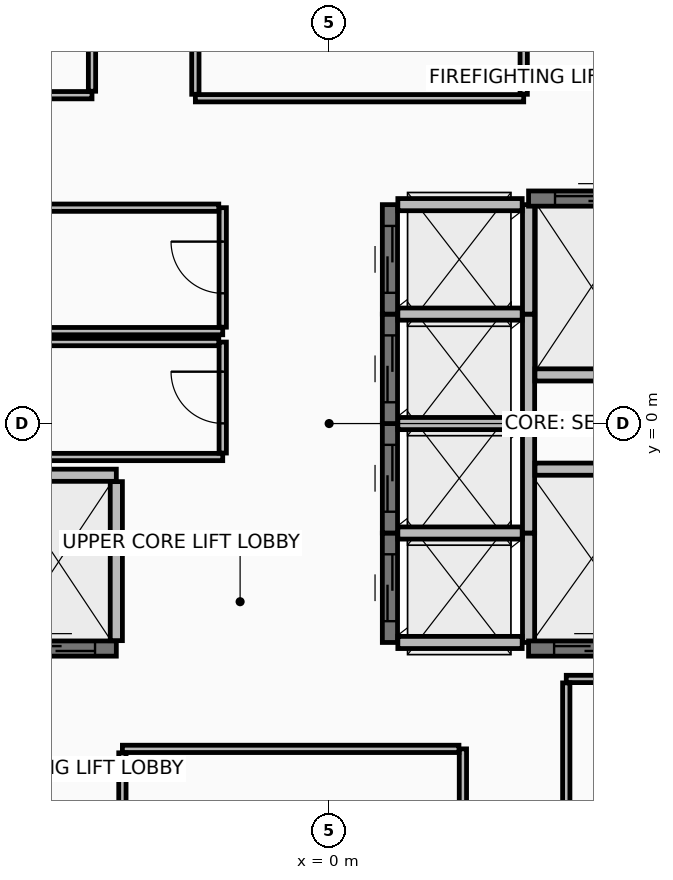
"""IFC4 building model, lengths in metres.
Left out: names, types, materials, properties, quantities, classifications, styles, units other than length and angle.
Written with IfcOpenShell. Run it as: python <this file> out.ifc"""

import sys

from ifc_helpers import new_model, si_unit, direction, frame, frame_2d, origin, place, context, subcontext, project, spatial, rectangle, extrude, element, fill, save


model = new_model("IFC4")
c1 = context("Model", 3, precision=1e-05, world=origin(), true_north=direction((0.0, 1.0)))
c2 = subcontext(c1, "Body", "Model", "MODEL_VIEW")
j1 = project(units=[si_unit("LENGTHUNIT", "METRE"), si_unit("PLANEANGLEUNIT", "RADIAN")], contexts=[c1])
p1 = place(None, origin())
s1 = spatial("IfcSite", under=j1, at=p1, CompositionType="ELEMENT")
p2 = place(p1, origin())
s2 = spatial("IfcBuilding", under=s1, at=p2, CompositionType="ELEMENT")
p3 = place(p2, frame((0.0, 0.0, 260.6)))
s3 = spatial("IfcBuildingStorey", under=s2, at=p3, CompositionType="ELEMENT", Elevation=260.6)
p4 = place(p3, frame((1.0, -3.6, 0.0), z_axis=(0.0, 0.0, 1.0), x_axis=(0.0, 1.0, 0.0)))
e1 = element("IfcWall", 1, at=p4, inside=s3, PredefinedType="SHEAR", context=c2, shape_type="SweptSolid", body=[
    extrude(rectangle(XDim=1.8, YDim=0.25, at=frame_2d((0.9, 0.0))), origin(), (0.0, 0.0, 1.0), 3.42),
])
p5 = place(p4, frame((0.35, 0.0, 0.0)))
e2 = element("IfcOpeningElement", 2, at=p5, cuts=e1, PredefinedType="OPENING", context=c2, shape_type="SweptSolid", body=[
    extrude(rectangle(XDim=1.1, YDim=2.2, at=frame_2d((0.55, 1.1))), frame((0.0, 0.135, 0.0), z_axis=(0.0, -1.0, 0.0), x_axis=(1.0, 0.0, 0.0)), (0.0, 0.0, 1.0), 0.27),
])
p6 = place(p3, frame((3.28, -3.6, 0.0), z_axis=(0.0, 0.0, 1.0), x_axis=(0.0, 1.0, 0.0)))
e3 = element("IfcWall", 3, at=p6, inside=s3, PredefinedType="PARTITIONING", context=c2, shape_type="SweptSolid", body=[
    extrude(rectangle(XDim=1.8, YDim=0.2, at=frame_2d((0.9, 0.0))), origin(), (0.0, 0.0, 1.0), 3.42),
])
for number, where, z_axis, x_axis in (
    (4, (1.13, -3.6, 0.0), (0.0, 0.0, 1.0), (1.0, 0.0, 0.0)),
    (5, (1.13, -1.8, 0.0), (0.0, 0.0, 1.0), (1.0, 0.0, 0.0)),
):
    element("IfcWall", number, at=place(p3, frame(where, z_axis=z_axis, x_axis=x_axis)), inside=s3, PredefinedType="PARTITIONING", context=c2, shape_type="SweptSolid", body=[
        extrude(rectangle(XDim=2.045, YDim=0.2, at=frame_2d((1.022, 0.0))), origin(), (0.0, 0.0, 1.0), 3.42),
    ])
p7 = place(p3, frame((1.0, -1.8, 0.0), z_axis=(0.0, 0.0, 1.0), x_axis=(0.0, 1.0, 0.0)))
e6 = element("IfcWall", 6, at=p7, inside=s3, PredefinedType="SHEAR", context=c2, shape_type="SweptSolid", body=[
    extrude(rectangle(XDim=1.8, YDim=0.25, at=frame_2d((0.9, 0.0))), origin(), (0.0, 0.0, 1.0), 3.42),
])
p8 = place(p7, frame((0.35, 0.0, 0.0)))
e7 = element("IfcOpeningElement", 7, at=p8, cuts=e6, PredefinedType="OPENING", context=c2, shape_type="SweptSolid", body=[
    extrude(rectangle(XDim=1.1, YDim=2.2, at=frame_2d((0.55, 1.1))), frame((0.0, 0.135, 0.0), z_axis=(0.0, -1.0, 0.0), x_axis=(1.0, 0.0, 0.0)), (0.0, 0.0, 1.0), 0.27),
])
p9 = place(p3, frame((3.28, -1.8, 0.0), z_axis=(0.0, 0.0, 1.0), x_axis=(0.0, 1.0, 0.0)))
e8 = element("IfcWall", 8, at=p9, inside=s3, PredefinedType="PARTITIONING", context=c2, shape_type="SweptSolid", body=[
    extrude(rectangle(XDim=1.8, YDim=0.2, at=frame_2d((0.9, 0.0))), origin(), (0.0, 0.0, 1.0), 3.42),
])
p10 = place(p3, frame((1.13, 0.0, 0.0), z_axis=(0.0, 0.0, 1.0), x_axis=(1.0, 0.0, 0.0)))
e9 = element("IfcWall", 9, at=p10, inside=s3, PredefinedType="PARTITIONING", context=c2, shape_type="SweptSolid", body=[
    extrude(rectangle(XDim=2.045, YDim=0.2, at=frame_2d((1.022, 0.0))), origin(), (0.0, 0.0, 1.0), 3.42),
])
p11 = place(p3, frame((1.0, 0.0, 0.0), z_axis=(0.0, 0.0, 1.0), x_axis=(0.0, 1.0, 0.0)))
e10 = element("IfcWall", 10, at=p11, inside=s3, PredefinedType="SHEAR", context=c2, shape_type="SweptSolid", body=[
    extrude(rectangle(XDim=1.8, YDim=0.25, at=frame_2d((0.9, 0.0))), origin(), (0.0, 0.0, 1.0), 3.42),
])
p12 = place(p11, frame((0.35, 0.0, 0.0)))
e11 = element("IfcOpeningElement", 11, at=p12, cuts=e10, PredefinedType="OPENING", context=c2, shape_type="SweptSolid", body=[
    extrude(rectangle(XDim=1.1, YDim=2.2, at=frame_2d((0.55, 1.1))), frame((0.0, 0.135, 0.0), z_axis=(0.0, -1.0, 0.0), x_axis=(1.0, 0.0, 0.0)), (0.0, 0.0, 1.0), 0.27),
])
p13 = place(p3, frame((3.28, 0.0, 0.0), z_axis=(0.0, 0.0, 1.0), x_axis=(0.0, 1.0, 0.0)))
e12 = element("IfcWall", 12, at=p13, inside=s3, PredefinedType="PARTITIONING", context=c2, shape_type="SweptSolid", body=[
    extrude(rectangle(XDim=1.8, YDim=0.2, at=frame_2d((0.9, 0.0))), origin(), (0.0, 0.0, 1.0), 3.42),
])
p14 = place(p3, frame((1.13, 1.8, 0.0), z_axis=(0.0, 0.0, 1.0), x_axis=(1.0, 0.0, 0.0)))
e13 = element("IfcWall", 13, at=p14, inside=s3, PredefinedType="PARTITIONING", context=c2, shape_type="SweptSolid", body=[
    extrude(rectangle(XDim=2.045, YDim=0.2, at=frame_2d((1.022, 0.0))), origin(), (0.0, 0.0, 1.0), 3.42),
])
p15 = place(p3, frame((1.0, 1.8, 0.0), z_axis=(0.0, 0.0, 1.0), x_axis=(0.0, 1.0, 0.0)))
e14 = element("IfcWall", 14, at=p15, inside=s3, PredefinedType="SHEAR", context=c2, shape_type="SweptSolid", body=[
    extrude(rectangle(XDim=1.8, YDim=0.25, at=frame_2d((0.9, 0.0))), origin(), (0.0, 0.0, 1.0), 3.42),
])
p16 = place(p15, frame((0.35, 0.0, 0.0)))
e15 = element("IfcOpeningElement", 15, at=p16, cuts=e14, PredefinedType="OPENING", context=c2, shape_type="SweptSolid", body=[
    extrude(rectangle(XDim=1.1, YDim=2.2, at=frame_2d((0.55, 1.1))), frame((0.0, 0.135, 0.0), z_axis=(0.0, -1.0, 0.0), x_axis=(1.0, 0.0, 0.0)), (0.0, 0.0, 1.0), 0.27),
])
p17 = place(p3, frame((3.28, 1.8, 0.0), z_axis=(0.0, 0.0, 1.0), x_axis=(0.0, 1.0, 0.0)))
e16 = element("IfcWall", 16, at=p17, inside=s3, PredefinedType="PARTITIONING", context=c2, shape_type="SweptSolid", body=[
    extrude(rectangle(XDim=1.8, YDim=0.2, at=frame_2d((0.9, 0.0))), origin(), (0.0, 0.0, 1.0), 3.42),
])
p18 = place(p3, frame((1.13, 3.6, 0.0), z_axis=(0.0, 0.0, 1.0), x_axis=(1.0, 0.0, 0.0)))
e17 = element("IfcWall", 17, at=p18, inside=s3, PredefinedType="PARTITIONING", context=c2, shape_type="SweptSolid", body=[
    extrude(rectangle(XDim=2.045, YDim=0.2, at=frame_2d((1.022, 0.0))), origin(), (0.0, 0.0, 1.0), 2.715),
])
p19 = place(p3, frame((-5.4, -3.7, 0.0), z_axis=(0.0, 0.0, 1.0), x_axis=(1.0, 0.0, 0.0)))
e18 = element("IfcWall", 18, at=p19, inside=s3, PredefinedType="SHEAR", context=c2, shape_type="SweptSolid", body=[
    extrude(rectangle(XDim=1.9, YDim=0.25, at=frame_2d((0.95, 0.0))), origin(), (0.0, 0.0, 1.0), 3.42),
])
p20 = place(p19, frame((0.35, 0.0, 0.0)))
e19 = element("IfcOpeningElement", 19, at=p20, cuts=e18, PredefinedType="OPENING", context=c2, shape_type="SweptSolid", body=[
    extrude(rectangle(XDim=1.2, YDim=2.2, at=frame_2d((0.6, 1.1))), frame((0.0, 0.135, 0.0), z_axis=(0.0, -1.0, 0.0), x_axis=(1.0, 0.0, 0.0)), (0.0, 0.0, 1.0), 0.27),
])
p21 = place(p3, frame((-5.27, -0.85, 0.0), z_axis=(0.0, 0.0, 1.0), x_axis=(1.0, 0.0, 0.0)))
e20 = element("IfcWall", 20, at=p21, inside=s3, PredefinedType="PARTITIONING", context=c2, shape_type="SweptSolid", body=[
    extrude(rectangle(XDim=1.77, YDim=0.2, at=frame_2d((0.885, 0.0))), origin(), (0.0, 0.0, 1.0), 3.42),
])
p22 = place(p3, frame((-3.5, -3.57, 0.0), z_axis=(0.0, 0.0, 1.0), x_axis=(0.0, 1.0, 0.0)))
e21 = element("IfcWall", 21, at=p22, inside=s3, PredefinedType="PARTITIONING", context=c2, shape_type="SweptSolid", body=[
    extrude(rectangle(XDim=2.615, YDim=0.2, at=frame_2d((1.308, 0.0))), origin(), (0.0, 0.0, 1.0), 3.42),
])
p23 = place(p3, frame((3.28, 3.7, 0.0), z_axis=(0.0, 0.0, 1.0), x_axis=(1.0, 0.0, 0.0)))
e22 = element("IfcWall", 22, at=p23, inside=s3, PredefinedType="SHEAR", context=c2, shape_type="SweptSolid", body=[
    extrude(rectangle(XDim=2.07, YDim=0.25, at=frame_2d((1.035, 0.0))), origin(), (0.0, 0.0, 1.0), 3.42),
])
p24 = place(p23, frame((0.435, 0.0, 0.0)))
e23 = element("IfcOpeningElement", 23, at=p24, cuts=e22, PredefinedType="OPENING", context=c2, shape_type="SweptSolid", body=[
    extrude(rectangle(XDim=1.2, YDim=2.2, at=frame_2d((0.6, 1.1))), frame((0.0, 0.135, 0.0), z_axis=(0.0, -1.0, 0.0), x_axis=(1.0, 0.0, 0.0)), (0.0, 0.0, 1.0), 0.27),
])
p25 = place(p3, frame((3.385, 0.8, 0.0), z_axis=(0.0, 0.0, 1.0), x_axis=(1.0, 0.0, 0.0)))
e24 = element("IfcWall", 24, at=p25, inside=s3, PredefinedType="PARTITIONING", context=c2, shape_type="SweptSolid", body=[
    extrude(rectangle(XDim=1.835, YDim=0.2, at=frame_2d((0.917, 0.0))), origin(), (0.0, 0.0, 1.0), 3.42),
])
p26 = place(p3, frame((3.28, -3.7, 0.0), z_axis=(0.0, 0.0, 1.0), x_axis=(1.0, 0.0, 0.0)))
e25 = element("IfcWall", 25, at=p26, inside=s3, PredefinedType="SHEAR", context=c2, shape_type="SweptSolid", body=[
    extrude(rectangle(XDim=1.94, YDim=0.25, at=frame_2d((0.97, 0.0))), origin(), (0.0, 0.0, 1.0), 3.42),
])
p27 = place(p26, frame((0.42, 0.0, 0.0)))
e26 = element("IfcOpeningElement", 26, at=p27, cuts=e25, PredefinedType="OPENING", context=c2, shape_type="SweptSolid", body=[
    extrude(rectangle(XDim=1.1, YDim=2.2, at=frame_2d((0.55, 1.1))), frame((0.0, 0.135, 0.0), z_axis=(0.0, -1.0, 0.0), x_axis=(1.0, 0.0, 0.0)), (0.0, 0.0, 1.0), 0.27),
])
p28 = place(p3, frame((3.385, -0.75, 0.0), z_axis=(0.0, 0.0, 1.0), x_axis=(1.0, 0.0, 0.0)))
e27 = element("IfcWall", 27, at=p28, inside=s3, PredefinedType="PARTITIONING", context=c2, shape_type="SweptSolid", body=[
    extrude(rectangle(XDim=1.835, YDim=0.2, at=frame_2d((0.917, 0.0))), origin(), (0.0, 0.0, 1.0), 3.42),
])
p29 = place(p3, frame((-5.22, 1.52, 0.0), z_axis=(0.0, 0.0, 1.0), x_axis=(1.0, 0.0, 0.0)))
e28 = element("IfcWall", 28, at=p29, inside=s3, PredefinedType="PARTITIONING", context=c2, shape_type="SweptSolid", body=[
    extrude(rectangle(XDim=3.47, YDim=0.12, at=frame_2d((1.735, 0.0))), origin(), (0.0, 0.0, 1.0), 3.42),
])
p30 = place(p3, frame((-1.75, 1.585, 0.0), z_axis=(0.0, 0.0, 1.0), x_axis=(0.0, 1.0, 0.0)))
e29 = element("IfcWall", 29, at=p30, inside=s3, PredefinedType="PARTITIONING", context=c2, shape_type="SweptSolid", body=[
    extrude(rectangle(XDim=1.965, YDim=0.12, at=frame_2d((0.982, 0.0))), origin(), (0.0, 0.0, 1.0), 3.42),
])
p31 = place(p30, frame((0.557, 0.0, 0.0)))
e30 = element("IfcOpeningElement", 30, at=p31, cuts=e29, PredefinedType="OPENING", context=c2, shape_type="SweptSolid", body=[
    extrude(rectangle(XDim=0.85, YDim=2.1, at=frame_2d((0.425, 1.05))), frame((0.0, 0.07, 0.0), z_axis=(0.0, -1.0, 0.0), x_axis=(1.0, 0.0, 0.0)), (0.0, 0.0, 1.0), 0.14),
])
p32 = place(p3, frame((-1.815, 3.55, 0.0), z_axis=(0.0, 0.0, 1.0), x_axis=(-1.0, 0.0, 0.0)))
e31 = element("IfcWall", 31, at=p32, inside=s3, PredefinedType="PARTITIONING", context=c2, shape_type="SweptSolid", body=[
    extrude(rectangle(XDim=3.405, YDim=0.12, at=frame_2d((1.703, 0.0))), origin(), (0.0, 0.0, 1.0), 3.42),
])
p33 = place(p3, frame((-5.22, -0.55, 0.0), z_axis=(0.0, 0.0, 1.0), x_axis=(1.0, 0.0, 0.0)))
e32 = element("IfcWall", 32, at=p33, inside=s3, PredefinedType="PARTITIONING", context=c2, shape_type="SweptSolid", body=[
    extrude(rectangle(XDim=3.47, YDim=0.12, at=frame_2d((1.735, 0.0))), origin(), (0.0, 0.0, 1.0), 3.42),
])
p34 = place(p3, frame((-1.75, -0.485, 0.0), z_axis=(0.0, 0.0, 1.0), x_axis=(0.0, 1.0, 0.0)))
e33 = element("IfcWall", 33, at=p34, inside=s3, PredefinedType="PARTITIONING", context=c2, shape_type="SweptSolid", body=[
    extrude(rectangle(XDim=1.825, YDim=0.12, at=frame_2d((0.913, 0.0))), origin(), (0.0, 0.0, 1.0), 3.42),
])
p35 = place(p34, frame((0.488, 0.0, 0.0)))
e34 = element("IfcOpeningElement", 34, at=p35, cuts=e33, PredefinedType="OPENING", context=c2, shape_type="SweptSolid", body=[
    extrude(rectangle(XDim=0.85, YDim=2.1, at=frame_2d((0.425, 1.05))), frame((0.0, 0.07, 0.0), z_axis=(0.0, -1.0, 0.0), x_axis=(1.0, 0.0, 0.0)), (0.0, 0.0, 1.0), 0.14),
])
p36 = place(p3, frame((-1.815, 1.34, 0.0), z_axis=(0.0, 0.0, 1.0), x_axis=(-1.0, 0.0, 0.0)))
e35 = element("IfcWall", 35, at=p36, inside=s3, PredefinedType="PARTITIONING", context=c2, shape_type="SweptSolid", body=[
    extrude(rectangle(XDim=3.405, YDim=0.12, at=frame_2d((1.703, 0.0))), origin(), (0.0, 0.0, 1.0), 3.42),
])
p37 = place(p3, frame((2.2, -7.42, 0.0), z_axis=(0.0, 0.0, 1.0), x_axis=(0.0, 1.0, 0.0)))
e36 = element("IfcWall", 36, at=p37, inside=s3, PredefinedType="PARTITIONING", context=c2, shape_type="SweptSolid", body=[
    extrude(rectangle(XDim=2.07, YDim=0.12, at=frame_2d((1.035, 0.0))), origin(), (0.0, 0.0, 1.0), 2.715),
])
p38 = place(p3, frame((2.135, -5.35, 0.0), z_axis=(0.0, 0.0, 1.0), x_axis=(-1.0, 0.0, 0.0)))
e37 = element("IfcWall", 37, at=p38, inside=s3, PredefinedType="PARTITIONING", context=c2, shape_type="SweptSolid", body=[
    extrude(rectangle(XDim=5.535, YDim=0.12, at=frame_2d((2.768, 0.0))), origin(), (0.0, 0.0, 1.0), 2.715),
])
p39 = place(p3, frame((-3.4, -5.415, 0.0), z_axis=(0.0, 0.0, 1.0), x_axis=(0.0, -1.0, 0.0)))
e38 = element("IfcWall", 38, at=p39, inside=s3, PredefinedType="PARTITIONING", context=c2, shape_type="SweptSolid", body=[
    extrude(rectangle(XDim=2.8, YDim=0.12, at=frame_2d((1.4, 0.0))), origin(), (0.0, 0.0, 1.0), 2.715),
])
p40 = place(p3, frame((-2.2, 5.35, 0.0), z_axis=(0.0, 0.0, 1.0), x_axis=(1.0, 0.0, 0.0)))
e39 = element("IfcWall", 39, at=p40, inside=s3, PredefinedType="PARTITIONING", context=c2, shape_type="SweptSolid", body=[
    extrude(rectangle(XDim=5.4, YDim=0.12, at=frame_2d((2.7, 0.0))), origin(), (0.0, 0.0, 1.0), 2.715),
])
p41 = place(p3, frame((3.2, 5.415, 0.0), z_axis=(0.0, 0.0, 1.0), x_axis=(0.0, 1.0, 0.0)))
e40 = element("IfcWall", 40, at=p41, inside=s3, PredefinedType="PARTITIONING", context=c2, shape_type="SweptSolid", body=[
    extrude(rectangle(XDim=2.8, YDim=0.12, at=frame_2d((1.4, 0.0))), origin(), (0.0, 0.0, 1.0), 2.715),
])
p42 = place(p3, frame((-2.2, 7.42, 0.0), z_axis=(0.0, 0.0, 1.0), x_axis=(0.0, -1.0, 0.0)))
e41 = element("IfcWall", 41, at=p42, inside=s3, PredefinedType="PARTITIONING", context=c2, shape_type="SweptSolid", body=[
    extrude(rectangle(XDim=2.005, YDim=0.12, at=frame_2d((1.002, 0.0))), origin(), (0.0, 0.0, 1.0), 2.715),
])
p43 = place(p3, frame((-6.2, 5.4, 0.0), z_axis=(0.0, 0.0, 1.0), x_axis=(1.0, 0.0, 0.0)))
e42 = element("IfcWall", 42, at=p43, inside=s3, PredefinedType="PARTITIONING", context=c2, shape_type="SweptSolid", body=[
    extrude(rectangle(XDim=2.3, YDim=0.12, at=frame_2d((1.15, 0.0))), origin(), (0.0, 0.0, 1.0), 3.42),
])
p44 = place(p3, frame((-3.9, 5.465, 0.0), z_axis=(0.0, 0.0, 1.0), x_axis=(0.0, 1.0, 0.0)))
e43 = element("IfcWall", 43, at=p44, inside=s3, PredefinedType="PARTITIONING", context=c2, shape_type="SweptSolid", body=[
    extrude(rectangle(XDim=2.75, YDim=0.12, at=frame_2d((1.375, 0.0))), origin(), (0.0, 0.0, 1.0), 2.715),
])
p45 = place(p3, frame((7.735, -4.2, 0.0), z_axis=(0.0, 0.0, 1.0), x_axis=(-1.0, 0.0, 0.0)))
e44 = element("IfcWall", 44, at=p45, inside=s3, PredefinedType="PARTITIONING", context=c2, shape_type="SweptSolid", body=[
    extrude(rectangle(XDim=3.835, YDim=0.12, at=frame_2d((1.917, 0.0))), origin(), (0.0, 0.0, 1.0), 3.42),
])
p46 = place(p3, frame((3.9, -4.265, 0.0), z_axis=(0.0, 0.0, 1.0), x_axis=(0.0, -1.0, 0.0)))
e45 = element("IfcWall", 45, at=p46, inside=s3, PredefinedType="PARTITIONING", context=c2, shape_type="SweptSolid", body=[
    extrude(rectangle(XDim=3.95, YDim=0.12, at=frame_2d((1.975, 0.0))), origin(), (0.0, 0.0, 1.0), 2.715),
])
p47 = place(p5, origin())
e46 = element("IfcDoor", 46, at=p47, inside=s3, OperationType="SLIDING_TO_LEFT", PredefinedType="DOOR", context=c2, shape_type="SweptSolid", body=[
    extrude(rectangle(XDim=1.1, YDim=2.2, at=frame_2d((0.55, 1.1))), frame((0.0, 0.025, 0.0), z_axis=(0.0, -1.0, 0.0), x_axis=(1.0, 0.0, 0.0)), (0.0, 0.0, 1.0), 0.05),
])
fill(e2, e46)
p48 = place(p8, origin())
e47 = element("IfcDoor", 47, at=p48, inside=s3, OperationType="SLIDING_TO_LEFT", PredefinedType="DOOR", context=c2, shape_type="SweptSolid", body=[
    extrude(rectangle(XDim=1.1, YDim=2.2, at=frame_2d((0.55, 1.1))), frame((0.0, 0.025, 0.0), z_axis=(0.0, -1.0, 0.0), x_axis=(1.0, 0.0, 0.0)), (0.0, 0.0, 1.0), 0.05),
])
fill(e7, e47)
p49 = place(p12, origin())
e48 = element("IfcDoor", 48, at=p49, inside=s3, OperationType="SLIDING_TO_LEFT", PredefinedType="DOOR", context=c2, shape_type="SweptSolid", body=[
    extrude(rectangle(XDim=1.1, YDim=2.2, at=frame_2d((0.55, 1.1))), frame((0.0, 0.025, 0.0), z_axis=(0.0, -1.0, 0.0), x_axis=(1.0, 0.0, 0.0)), (0.0, 0.0, 1.0), 0.05),
])
fill(e11, e48)
p50 = place(p16, origin())
e49 = element("IfcDoor", 49, at=p50, inside=s3, OperationType="SLIDING_TO_LEFT", PredefinedType="DOOR", context=c2, shape_type="SweptSolid", body=[
    extrude(rectangle(XDim=1.1, YDim=2.2, at=frame_2d((0.55, 1.1))), frame((0.0, 0.025, 0.0), z_axis=(0.0, -1.0, 0.0), x_axis=(1.0, 0.0, 0.0)), (0.0, 0.0, 1.0), 0.05),
])
fill(e15, e49)
p51 = place(p20, origin())
e50 = element("IfcDoor", 50, at=p51, inside=s3, OperationType="SLIDING_TO_RIGHT", PredefinedType="DOOR", context=c2, shape_type="SweptSolid", body=[
    extrude(rectangle(XDim=1.2, YDim=2.2, at=frame_2d((0.6, 1.1))), frame((0.0, 0.025, 0.0), z_axis=(0.0, -1.0, 0.0), x_axis=(1.0, 0.0, 0.0)), (0.0, 0.0, 1.0), 0.05),
])
fill(e19, e50)
p52 = place(p24, origin())
e51 = element("IfcDoor", 51, at=p52, inside=s3, OperationType="SLIDING_TO_RIGHT", PredefinedType="DOOR", context=c2, shape_type="SweptSolid", body=[
    extrude(rectangle(XDim=1.2, YDim=2.2, at=frame_2d((0.6, 1.1))), frame((0.0, 0.025, 0.0), z_axis=(0.0, -1.0, 0.0), x_axis=(1.0, 0.0, 0.0)), (0.0, 0.0, 1.0), 0.05),
])
fill(e23, e51)
p53 = place(p27, origin())
e52 = element("IfcDoor", 52, at=p53, inside=s3, OperationType="SLIDING_TO_LEFT", PredefinedType="DOOR", context=c2, shape_type="SweptSolid", body=[
    extrude(rectangle(XDim=1.1, YDim=2.2, at=frame_2d((0.55, 1.1))), frame((0.0, 0.025, 0.0), z_axis=(0.0, -1.0, 0.0), x_axis=(1.0, 0.0, 0.0)), (0.0, 0.0, 1.0), 0.05),
])
fill(e26, e52)
p54 = place(p31, frame((0.85, 0.0, 0.0), z_axis=(0.0, 0.0, 1.0), x_axis=(-1.0, 0.0, 0.0)))
e53 = element("IfcDoor", 53, at=p54, inside=s3, OperationType="SINGLE_SWING_RIGHT", PredefinedType="DOOR", context=c2, shape_type="SweptSolid", body=[
    extrude(rectangle(XDim=0.85, YDim=2.1, at=frame_2d((0.425, 1.05))), frame((0.0, 0.025, 0.0), z_axis=(0.0, -1.0, 0.0), x_axis=(1.0, 0.0, 0.0)), (0.0, 0.0, 1.0), 0.05),
])
fill(e30, e53)
p55 = place(p35, frame((0.85, 0.0, 0.0), z_axis=(0.0, 0.0, 1.0), x_axis=(-1.0, 0.0, 0.0)))
e54 = element("IfcDoor", 54, at=p55, inside=s3, OperationType="SINGLE_SWING_RIGHT", PredefinedType="DOOR", context=c2, shape_type="SweptSolid", body=[
    extrude(rectangle(XDim=0.85, YDim=2.1, at=frame_2d((0.425, 1.05))), frame((0.0, 0.025, 0.0), z_axis=(0.0, -1.0, 0.0), x_axis=(1.0, 0.0, 0.0)), (0.0, 0.0, 1.0), 0.05),
])
fill(e34, e54)
save(model, sys.argv[1])
